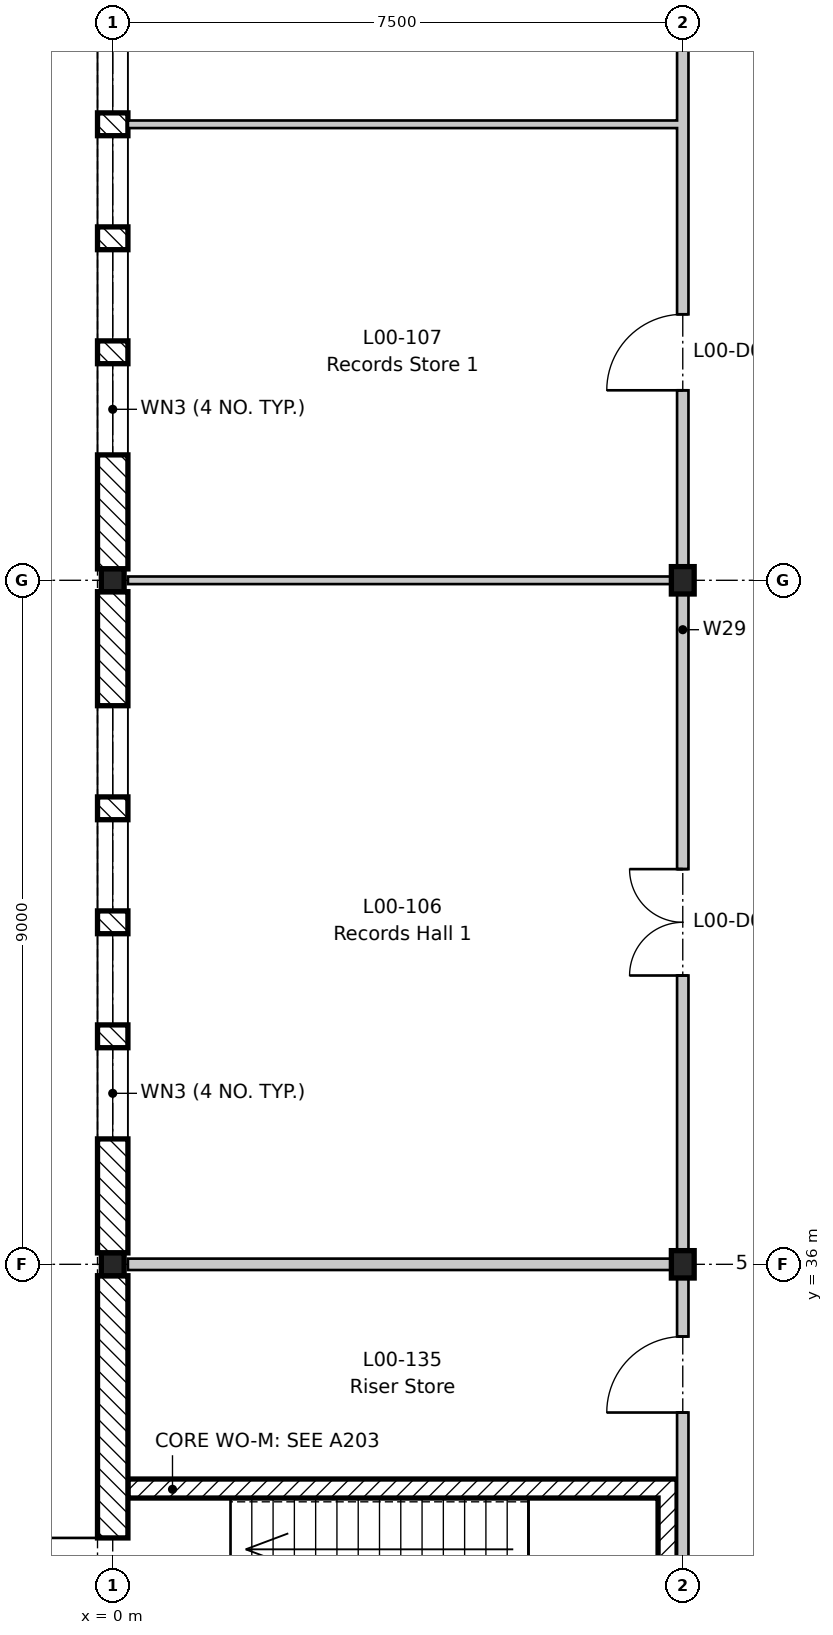
"""IFC4 building model, lengths in metres.
Left out: names, types, materials, properties, quantities, classifications, styles, units other than length and angle.
Written with IfcOpenShell. Run it as: python <this file> out.ifc"""

import sys

from ifc_helpers import new_model, si_unit, direction, frame, frame_2d, origin, origin_2d, place, context, subcontext, project, spatial, rectangle, i_section, extrude, element, fill, save


model = new_model("IFC4")
c1 = context("Model", 3, precision=1e-05, world=origin(), true_north=direction((0.0, 1.0)))
c2 = subcontext(c1, "Body", "Model", "MODEL_VIEW")
j1 = project(units=[si_unit("LENGTHUNIT", "METRE"), si_unit("PLANEANGLEUNIT", "RADIAN")], contexts=[c1])
p1 = place(None, origin())
s1 = spatial("IfcSite", under=j1, at=p1, CompositionType="ELEMENT")
p2 = place(p1, origin())
s2 = spatial("IfcBuilding", under=s1, at=p2, CompositionType="ELEMENT")
p3 = place(p2, origin())
s3 = spatial("IfcBuildingStorey", under=s2, at=p3, CompositionType="ELEMENT", Elevation=0.0)
for number, where, z_axis, x_axis in (
    (1, (0.0, 36.0, -0.6), (0.0, 0.0, 1.0), (1.0, 0.0, 0.0)),
    (2, (0.0, 45.0, -0.6), (0.0, 0.0, 1.0), (1.0, 0.0, 0.0)),
):
    element("IfcColumn", number, at=place(p3, frame(where, z_axis=z_axis, x_axis=x_axis)), inside=s3, PredefinedType="COLUMN", context=c2, shape_type="SweptSolid", body=[
        extrude(i_section(OverallWidth=0.3, OverallDepth=0.3, WebThickness=0.011, FlangeThickness=0.019, FilletRadius=0.027, at=origin_2d()), origin(), (0.0, 0.0, 1.0), 5.8),
    ])
for number, where, z_axis, x_axis in (
    (3, (7.5, 36.0, -0.6), (0.0, 0.0, 1.0), (1.0, 0.0, 0.0)),
    (4, (7.5, 45.0, -0.6), (0.0, 0.0, 1.0), (1.0, 0.0, 0.0)),
):
    element("IfcColumn", number, at=place(p3, frame(where, z_axis=z_axis, x_axis=x_axis)), inside=s3, PredefinedType="COLUMN", context=c2, shape_type="SweptSolid", body=[
        extrude(i_section(OverallWidth=0.3, OverallDepth=0.36, WebThickness=0.012, FlangeThickness=0.022, FilletRadius=0.027, at=origin_2d()), origin(), (0.0, 0.0, 1.0), 5.8),
    ])
p4 = place(p3, frame((0.2, 33.05, 0.0), z_axis=(0.0, 0.0, 1.0), x_axis=(1.0, 0.0, 0.0)))
e5 = element("IfcWall", 5, at=p4, inside=s3, PredefinedType="SHEAR", context=c2, shape_type="SweptSolid", body=[
    extrude(rectangle(XDim=7.225, YDim=0.25, at=frame_2d((3.613, 0.0))), origin(), (0.0, 0.0, 1.0), 5.2),
])
p5 = place(p3, frame((7.3, 30.075, 0.0), z_axis=(0.0, 0.0, 1.0), x_axis=(0.0, 1.0, 0.0)))
e6 = element("IfcWall", 6, at=p5, inside=s3, PredefinedType="SHEAR", context=c2, shape_type="SweptSolid", body=[
    extrude(rectangle(XDim=2.85, YDim=0.25, at=frame_2d((1.425, 0.0))), origin(), (0.0, 0.0, 1.0), 5.2),
])
p6 = place(p3, frame((0.0, 27.15, 0.0), z_axis=(0.0, 0.0, 1.0), x_axis=(0.0, 1.0, 0.0)))
e7 = element("IfcWall", 7, at=p6, inside=s3, PredefinedType="STANDARD", context=c2, shape_type="SweptSolid", body=[
    extrude(rectangle(XDim=8.7, YDim=0.4, at=frame_2d((4.35, 0.0))), origin(), (0.0, 0.0, 1.0), 4.8),
])
p7 = place(p6, frame((3.45, 0.0, 0.0)))
e8 = element("IfcOpeningElement", 8, at=p7, cuts=e7, PredefinedType="OPENING", context=c2, shape_type="SweptSolid", body=[
    extrude(rectangle(XDim=1.8, YDim=2.1, at=frame_2d((0.9, 1.05))), frame((0.0, 0.21, 0.0), z_axis=(0.0, -1.0, 0.0), x_axis=(1.0, 0.0, 0.0)), (0.0, 0.0, 1.0), 0.42),
])
p8 = place(p3, frame((0.0, 36.15, 0.0), z_axis=(0.0, 0.0, 1.0), x_axis=(0.0, 1.0, 0.0)))
e9 = element("IfcWall", 9, at=p8, inside=s3, PredefinedType="STANDARD", context=c2, shape_type="SweptSolid", body=[
    extrude(rectangle(XDim=8.7, YDim=0.4, at=frame_2d((4.35, 0.0))), origin(), (0.0, 0.0, 1.0), 4.8),
])
p9 = place(p8, frame((1.5, 0.0, 0.6)))
e10 = element("IfcOpeningElement", 10, at=p9, cuts=e9, PredefinedType="OPENING", context=c2, shape_type="SweptSolid", body=[
    extrude(rectangle(XDim=1.2, YDim=3.9, at=frame_2d((0.6, 1.95))), frame((0.0, 0.21, 0.0), z_axis=(0.0, -1.0, 0.0), x_axis=(1.0, 0.0, 0.0)), (0.0, 0.0, 1.0), 0.42),
])
p10 = place(p8, frame((3.0, 0.0, 0.6)))
e11 = element("IfcOpeningElement", 11, at=p10, cuts=e9, PredefinedType="OPENING", context=c2, shape_type="SweptSolid", body=[
    extrude(rectangle(XDim=1.2, YDim=3.9, at=frame_2d((0.6, 1.95))), frame((0.0, 0.21, 0.0), z_axis=(0.0, -1.0, 0.0), x_axis=(1.0, 0.0, 0.0)), (0.0, 0.0, 1.0), 0.42),
])
p11 = place(p8, frame((4.5, 0.0, 0.6)))
e12 = element("IfcOpeningElement", 12, at=p11, cuts=e9, PredefinedType="OPENING", context=c2, shape_type="SweptSolid", body=[
    extrude(rectangle(XDim=1.2, YDim=3.9, at=frame_2d((0.6, 1.95))), frame((0.0, 0.21, 0.0), z_axis=(0.0, -1.0, 0.0), x_axis=(1.0, 0.0, 0.0)), (0.0, 0.0, 1.0), 0.42),
])
p12 = place(p8, frame((6.0, 0.0, 0.6)))
e13 = element("IfcOpeningElement", 13, at=p12, cuts=e9, PredefinedType="OPENING", context=c2, shape_type="SweptSolid", body=[
    extrude(rectangle(XDim=1.2, YDim=3.9, at=frame_2d((0.6, 1.95))), frame((0.0, 0.21, 0.0), z_axis=(0.0, -1.0, 0.0), x_axis=(1.0, 0.0, 0.0)), (0.0, 0.0, 1.0), 0.42),
])
p13 = place(p3, frame((0.0, 45.15, 0.0), z_axis=(0.0, 0.0, 1.0), x_axis=(0.0, 1.0, 0.0)))
e14 = element("IfcWall", 14, at=p13, inside=s3, PredefinedType="STANDARD", context=c2, shape_type="SweptSolid", body=[
    extrude(rectangle(XDim=8.7, YDim=0.4, at=frame_2d((4.35, 0.0))), origin(), (0.0, 0.0, 1.0), 4.8),
])
p14 = place(p13, frame((1.5, 0.0, 0.6)))
e15 = element("IfcOpeningElement", 15, at=p14, cuts=e14, PredefinedType="OPENING", context=c2, shape_type="SweptSolid", body=[
    extrude(rectangle(XDim=1.2, YDim=3.9, at=frame_2d((0.6, 1.95))), frame((0.0, 0.21, 0.0), z_axis=(0.0, -1.0, 0.0), x_axis=(1.0, 0.0, 0.0)), (0.0, 0.0, 1.0), 0.42),
])
p15 = place(p13, frame((3.0, 0.0, 0.6)))
e16 = element("IfcOpeningElement", 16, at=p15, cuts=e14, PredefinedType="OPENING", context=c2, shape_type="SweptSolid", body=[
    extrude(rectangle(XDim=1.2, YDim=3.9, at=frame_2d((0.6, 1.95))), frame((0.0, 0.21, 0.0), z_axis=(0.0, -1.0, 0.0), x_axis=(1.0, 0.0, 0.0)), (0.0, 0.0, 1.0), 0.42),
])
p16 = place(p13, frame((4.5, 0.0, 0.6)))
e17 = element("IfcOpeningElement", 17, at=p16, cuts=e14, PredefinedType="OPENING", context=c2, shape_type="SweptSolid", body=[
    extrude(rectangle(XDim=1.2, YDim=3.9, at=frame_2d((0.6, 1.95))), frame((0.0, 0.21, 0.0), z_axis=(0.0, -1.0, 0.0), x_axis=(1.0, 0.0, 0.0)), (0.0, 0.0, 1.0), 0.42),
])
p17 = place(p13, frame((6.0, 0.0, 0.6)))
e18 = element("IfcOpeningElement", 18, at=p17, cuts=e14, PredefinedType="OPENING", context=c2, shape_type="SweptSolid", body=[
    extrude(rectangle(XDim=1.2, YDim=3.9, at=frame_2d((0.6, 1.95))), frame((0.0, 0.21, 0.0), z_axis=(0.0, -1.0, 0.0), x_axis=(1.0, 0.0, 0.0)), (0.0, 0.0, 1.0), 0.42),
])
p18 = place(p3, frame((0.2, 36.0, 0.0), z_axis=(0.0, 0.0, 1.0), x_axis=(1.0, 0.0, 0.0)))
e19 = element("IfcWall", 19, at=p18, inside=s3, PredefinedType="PARTITIONING", context=c2, shape_type="SweptSolid", body=[
    extrude(rectangle(XDim=7.225, YDim=0.15, at=frame_2d((3.613, 0.0))), origin(), (0.0, 0.0, 1.0), 4.85),
])
p19 = place(p3, frame((0.2, 45.0, 0.0), z_axis=(0.0, 0.0, 1.0), x_axis=(1.0, 0.0, 0.0)))
e20 = element("IfcWall", 20, at=p19, inside=s3, PredefinedType="PARTITIONING", context=c2, shape_type="SweptSolid", body=[
    extrude(rectangle(XDim=7.225, YDim=0.1, at=frame_2d((3.613, 0.0))), origin(), (0.0, 0.0, 1.0), 4.85),
])
p20 = place(p3, frame((0.2, 51.0, 0.0), z_axis=(0.0, 0.0, 1.0), x_axis=(1.0, 0.0, 0.0)))
e21 = element("IfcWall", 21, at=p20, inside=s3, PredefinedType="PARTITIONING", context=c2, shape_type="SweptSolid", body=[
    extrude(rectangle(XDim=7.225, YDim=0.1, at=frame_2d((3.613, 0.0))), origin(), (0.0, 0.0, 1.0), 5.2),
])
p21 = place(p3, frame((7.5, -8.8, 0.0), z_axis=(0.0, 0.0, 1.0), x_axis=(0.0, 1.0, 0.0)))
e22 = element("IfcWall", 22, at=p21, inside=s3, PredefinedType="PARTITIONING", context=c2, shape_type="SweptSolid", body=[
    extrude(rectangle(XDim=79.3, YDim=0.15, at=frame_2d((39.65, 0.0))), origin(), (0.0, 0.0, 1.0), 4.68),
])
p22 = place(p21, frame((18.8, 0.0, 0.0)))
e23 = element("IfcOpeningElement", 23, at=p22, cuts=e22, PredefinedType="OPENING", context=c2, shape_type="SweptSolid", body=[
    extrude(rectangle(XDim=1.0, YDim=2.1, at=frame_2d((0.5, 1.05))), frame((0.0, 0.085, 0.0), z_axis=(0.0, -1.0, 0.0), x_axis=(1.0, 0.0, 0.0)), (0.0, 0.0, 1.0), 0.17),
])
p23 = place(p21, frame((23.3, 0.0, 0.0)))
e24 = element("IfcOpeningElement", 24, at=p23, cuts=e22, PredefinedType="OPENING", context=c2, shape_type="SweptSolid", body=[
    extrude(rectangle(XDim=1.0, YDim=2.1, at=frame_2d((0.5, 1.05))), frame((0.0, 0.085, 0.0), z_axis=(0.0, -1.0, 0.0), x_axis=(1.0, 0.0, 0.0)), (0.0, 0.0, 1.0), 0.17),
])
p24 = place(p21, frame((27.8, 0.0, 0.0)))
e25 = element("IfcOpeningElement", 25, at=p24, cuts=e22, PredefinedType="OPENING", context=c2, shape_type="SweptSolid", body=[
    extrude(rectangle(XDim=1.0, YDim=2.1, at=frame_2d((0.5, 1.05))), frame((0.0, 0.085, 0.0), z_axis=(0.0, -1.0, 0.0), x_axis=(1.0, 0.0, 0.0)), (0.0, 0.0, 1.0), 0.17),
])
p25 = place(p21, frame((30.8, 0.0, 0.0)))
e26 = element("IfcOpeningElement", 26, at=p25, cuts=e22, PredefinedType="OPENING", context=c2, shape_type="SweptSolid", body=[
    extrude(rectangle(XDim=1.0, YDim=2.1, at=frame_2d((0.5, 1.05))), frame((0.0, 0.085, 0.0), z_axis=(0.0, -1.0, 0.0), x_axis=(1.0, 0.0, 0.0)), (0.0, 0.0, 1.0), 0.17),
])
p26 = place(p21, frame((33.8, 0.0, 0.0)))
e27 = element("IfcOpeningElement", 27, at=p26, cuts=e22, PredefinedType="OPENING", context=c2, shape_type="SweptSolid", body=[
    extrude(rectangle(XDim=1.0, YDim=2.1, at=frame_2d((0.5, 1.05))), frame((0.0, 0.085, 0.0), z_axis=(0.0, -1.0, 0.0), x_axis=(1.0, 0.0, 0.0)), (0.0, 0.0, 1.0), 0.17),
])
p27 = place(p21, frame((48.6, 0.0, 0.0)))
e28 = element("IfcOpeningElement", 28, at=p27, cuts=e22, PredefinedType="OPENING", context=c2, shape_type="SweptSolid", body=[
    extrude(rectangle(XDim=1.4, YDim=2.1, at=frame_2d((0.7, 1.05))), frame((0.0, 0.085, 0.0), z_axis=(0.0, -1.0, 0.0), x_axis=(1.0, 0.0, 0.0)), (0.0, 0.0, 1.0), 0.17),
])
p28 = place(p21, frame((56.3, 0.0, 0.0)))
e29 = element("IfcOpeningElement", 29, at=p28, cuts=e22, PredefinedType="OPENING", context=c2, shape_type="SweptSolid", body=[
    extrude(rectangle(XDim=1.0, YDim=2.1, at=frame_2d((0.5, 1.05))), frame((0.0, 0.085, 0.0), z_axis=(0.0, -1.0, 0.0), x_axis=(1.0, 0.0, 0.0)), (0.0, 0.0, 1.0), 0.17),
])
p29 = place(p21, frame((60.8, 0.0, 0.0)))
e30 = element("IfcOpeningElement", 30, at=p29, cuts=e22, PredefinedType="OPENING", context=c2, shape_type="SweptSolid", body=[
    extrude(rectangle(XDim=1.0, YDim=2.1, at=frame_2d((0.5, 1.05))), frame((0.0, 0.085, 0.0), z_axis=(0.0, -1.0, 0.0), x_axis=(1.0, 0.0, 0.0)), (0.0, 0.0, 1.0), 0.17),
])
p30 = place(p21, frame((12.6, 0.0, 0.0)))
e31 = element("IfcOpeningElement", 31, at=p30, cuts=e22, PredefinedType="OPENING", context=c2, shape_type="SweptSolid", body=[
    extrude(rectangle(XDim=1.4, YDim=2.1, at=frame_2d((0.7, 1.05))), frame((0.0, 0.085, 0.0), z_axis=(0.0, -1.0, 0.0), x_axis=(1.0, 0.0, 0.0)), (0.0, 0.0, 1.0), 0.17),
])
p31 = place(p21, frame((3.6, 0.0, 0.0)))
e32 = element("IfcOpeningElement", 32, at=p31, cuts=e22, PredefinedType="OPENING", context=c2, shape_type="SweptSolid", body=[
    extrude(rectangle(XDim=1.4, YDim=2.1, at=frame_2d((0.7, 1.05))), frame((0.0, 0.085, 0.0), z_axis=(0.0, -1.0, 0.0), x_axis=(1.0, 0.0, 0.0)), (0.0, 0.0, 1.0), 0.17),
])
p32 = place(p21, frame((63.55, 0.0, 0.0)))
e33 = element("IfcOpeningElement", 33, at=p32, cuts=e22, PredefinedType="OPENING", context=c2, shape_type="SweptSolid", body=[
    extrude(rectangle(XDim=1.4, YDim=2.1, at=frame_2d((0.7, 1.05))), frame((0.0, 0.085, 0.0), z_axis=(0.0, -1.0, 0.0), x_axis=(1.0, 0.0, 0.0)), (0.0, 0.0, 1.0), 0.17),
])
p33 = place(p21, frame((69.6, 0.0, 0.0)))
e34 = element("IfcOpeningElement", 34, at=p33, cuts=e22, PredefinedType="OPENING", context=c2, shape_type="SweptSolid", body=[
    extrude(rectangle(XDim=1.4, YDim=2.1, at=frame_2d((0.7, 1.05))), frame((0.0, 0.085, 0.0), z_axis=(0.0, -1.0, 0.0), x_axis=(1.0, 0.0, 0.0)), (0.0, 0.0, 1.0), 0.17),
])
p34 = place(p21, frame((42.85, 0.0, 0.0)))
e35 = element("IfcOpeningElement", 35, at=p34, cuts=e22, PredefinedType="OPENING", context=c2, shape_type="SweptSolid", body=[
    extrude(rectangle(XDim=1.0, YDim=2.1, at=frame_2d((0.5, 1.05))), frame((0.0, 0.085, 0.0), z_axis=(0.0, -1.0, 0.0), x_axis=(1.0, 0.0, 0.0)), (0.0, 0.0, 1.0), 0.17),
])
p35 = place(p21, frame((36.55, 0.0, 0.0)))
e36 = element("IfcOpeningElement", 36, at=p35, cuts=e22, PredefinedType="OPENING", context=c2, shape_type="SweptSolid", body=[
    extrude(rectangle(XDim=1.4, YDim=2.1, at=frame_2d((0.7, 1.05))), frame((0.0, 0.085, 0.0), z_axis=(0.0, -1.0, 0.0), x_axis=(1.0, 0.0, 0.0)), (0.0, 0.0, 1.0), 0.17),
])
p36 = place(p21, frame((72.8, 0.0, 0.0)))
e37 = element("IfcOpeningElement", 37, at=p36, cuts=e22, PredefinedType="OPENING", context=c2, shape_type="SweptSolid", body=[
    extrude(rectangle(XDim=1.0, YDim=2.1, at=frame_2d((0.5, 1.05))), frame((0.0, 0.085, 0.0), z_axis=(0.0, -1.0, 0.0), x_axis=(1.0, 0.0, 0.0)), (0.0, 0.0, 1.0), 0.17),
])
p37 = place(p7, origin())
e38 = element("IfcDoor", 38, at=p37, inside=s3, OperationType="DOUBLE_DOOR_SINGLE_SWING", PredefinedType="DOOR", context=c2, shape_type="SweptSolid", body=[
    extrude(rectangle(XDim=1.8, YDim=2.1, at=frame_2d((0.9, 1.05))), frame((0.0, 0.025, 0.0), z_axis=(0.0, -1.0, 0.0), x_axis=(1.0, 0.0, 0.0)), (0.0, 0.0, 1.0), 0.05),
])
fill(e8, e38)
p38 = place(p9, origin())
e39 = element("IfcWindow", 39, at=p38, inside=s3, PartitioningType="SINGLE_PANEL", PredefinedType="WINDOW", context=c2, shape_type="SweptSolid", body=[
    extrude(rectangle(XDim=1.2, YDim=3.9, at=frame_2d((0.6, 1.95))), frame((0.0, 0.03, 0.0), z_axis=(0.0, -1.0, 0.0), x_axis=(1.0, 0.0, 0.0)), (0.0, 0.0, 1.0), 0.06),
])
fill(e10, e39)
p39 = place(p10, origin())
e40 = element("IfcWindow", 40, at=p39, inside=s3, PartitioningType="SINGLE_PANEL", PredefinedType="WINDOW", context=c2, shape_type="SweptSolid", body=[
    extrude(rectangle(XDim=1.2, YDim=3.9, at=frame_2d((0.6, 1.95))), frame((0.0, 0.03, 0.0), z_axis=(0.0, -1.0, 0.0), x_axis=(1.0, 0.0, 0.0)), (0.0, 0.0, 1.0), 0.06),
])
fill(e11, e40)
p40 = place(p11, origin())
e41 = element("IfcWindow", 41, at=p40, inside=s3, PartitioningType="SINGLE_PANEL", PredefinedType="WINDOW", context=c2, shape_type="SweptSolid", body=[
    extrude(rectangle(XDim=1.2, YDim=3.9, at=frame_2d((0.6, 1.95))), frame((0.0, 0.03, 0.0), z_axis=(0.0, -1.0, 0.0), x_axis=(1.0, 0.0, 0.0)), (0.0, 0.0, 1.0), 0.06),
])
fill(e12, e41)
p41 = place(p12, origin())
e42 = element("IfcWindow", 42, at=p41, inside=s3, PartitioningType="SINGLE_PANEL", PredefinedType="WINDOW", context=c2, shape_type="SweptSolid", body=[
    extrude(rectangle(XDim=1.2, YDim=3.9, at=frame_2d((0.6, 1.95))), frame((0.0, 0.03, 0.0), z_axis=(0.0, -1.0, 0.0), x_axis=(1.0, 0.0, 0.0)), (0.0, 0.0, 1.0), 0.06),
])
fill(e13, e42)
p42 = place(p14, origin())
e43 = element("IfcWindow", 43, at=p42, inside=s3, PartitioningType="SINGLE_PANEL", PredefinedType="WINDOW", context=c2, shape_type="SweptSolid", body=[
    extrude(rectangle(XDim=1.2, YDim=3.9, at=frame_2d((0.6, 1.95))), frame((0.0, 0.03, 0.0), z_axis=(0.0, -1.0, 0.0), x_axis=(1.0, 0.0, 0.0)), (0.0, 0.0, 1.0), 0.06),
])
fill(e15, e43)
p43 = place(p15, origin())
e44 = element("IfcWindow", 44, at=p43, inside=s3, PartitioningType="SINGLE_PANEL", PredefinedType="WINDOW", context=c2, shape_type="SweptSolid", body=[
    extrude(rectangle(XDim=1.2, YDim=3.9, at=frame_2d((0.6, 1.95))), frame((0.0, 0.03, 0.0), z_axis=(0.0, -1.0, 0.0), x_axis=(1.0, 0.0, 0.0)), (0.0, 0.0, 1.0), 0.06),
])
fill(e16, e44)
p44 = place(p16, origin())
e45 = element("IfcWindow", 45, at=p44, inside=s3, PartitioningType="SINGLE_PANEL", PredefinedType="WINDOW", context=c2, shape_type="SweptSolid", body=[
    extrude(rectangle(XDim=1.2, YDim=3.9, at=frame_2d((0.6, 1.95))), frame((0.0, 0.03, 0.0), z_axis=(0.0, -1.0, 0.0), x_axis=(1.0, 0.0, 0.0)), (0.0, 0.0, 1.0), 0.06),
])
fill(e17, e45)
p45 = place(p17, origin())
e46 = element("IfcWindow", 46, at=p45, inside=s3, PartitioningType="SINGLE_PANEL", PredefinedType="WINDOW", context=c2, shape_type="SweptSolid", body=[
    extrude(rectangle(XDim=1.2, YDim=3.9, at=frame_2d((0.6, 1.95))), frame((0.0, 0.03, 0.0), z_axis=(0.0, -1.0, 0.0), x_axis=(1.0, 0.0, 0.0)), (0.0, 0.0, 1.0), 0.06),
])
fill(e18, e46)
p46 = place(p27, origin())
e47 = element("IfcDoor", 47, at=p46, inside=s3, OperationType="DOUBLE_DOOR_SINGLE_SWING", PredefinedType="DOOR", context=c2, shape_type="SweptSolid", body=[
    extrude(rectangle(XDim=1.4, YDim=2.1, at=frame_2d((0.7, 1.05))), frame((0.0, 0.025, 0.0), z_axis=(0.0, -1.0, 0.0), x_axis=(1.0, 0.0, 0.0)), (0.0, 0.0, 1.0), 0.05),
])
fill(e28, e47)
p47 = place(p28, origin())
e48 = element("IfcDoor", 48, at=p47, inside=s3, OperationType="SINGLE_SWING_LEFT", PredefinedType="DOOR", context=c2, shape_type="SweptSolid", body=[
    extrude(rectangle(XDim=1.0, YDim=2.1, at=frame_2d((0.5, 1.05))), frame((0.0, 0.025, 0.0), z_axis=(0.0, -1.0, 0.0), x_axis=(1.0, 0.0, 0.0)), (0.0, 0.0, 1.0), 0.05),
])
fill(e29, e48)
p48 = place(p34, origin())
e49 = element("IfcDoor", 49, at=p48, inside=s3, OperationType="SINGLE_SWING_LEFT", PredefinedType="DOOR", context=c2, shape_type="SweptSolid", body=[
    extrude(rectangle(XDim=1.0, YDim=2.1, at=frame_2d((0.5, 1.05))), frame((0.0, 0.025, 0.0), z_axis=(0.0, -1.0, 0.0), x_axis=(1.0, 0.0, 0.0)), (0.0, 0.0, 1.0), 0.05),
])
fill(e35, e49)
save(model, sys.argv[1])
